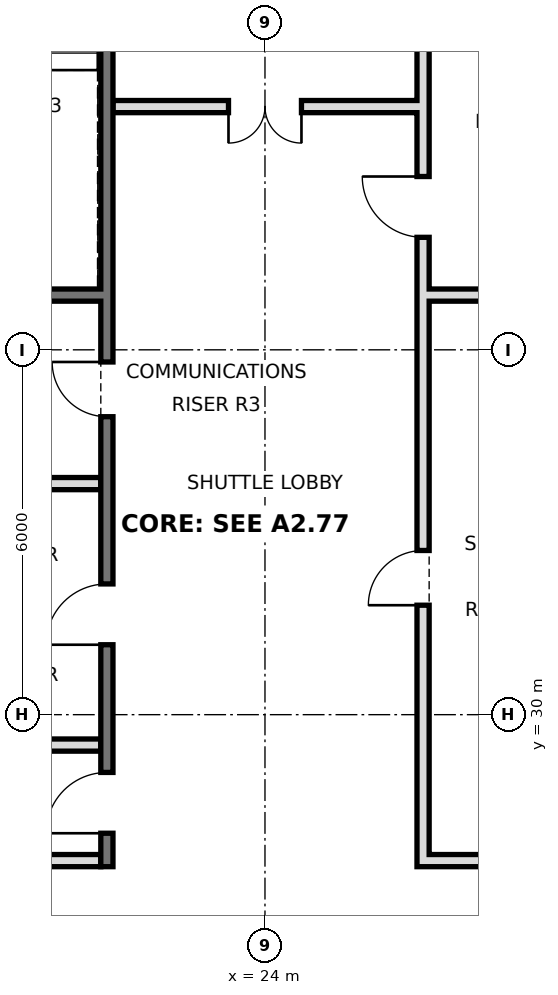
"""IFC4 building model, lengths in metres.
Left out: names, types, materials, properties, quantities, classifications, styles, units other than length and angle.
Written with IfcOpenShell. Run it as: python <this file> out.ifc"""

import sys

from ifc_helpers import new_model, si_unit, direction, frame, frame_2d, origin, place, context, subcontext, project, spatial, rectangle, extrude, element, fill, save


model = new_model("IFC4")
c1 = context("Model", 3, precision=1e-05, world=origin(), true_north=direction((0.0, 1.0)))
c2 = subcontext(c1, "Body", "Model", "MODEL_VIEW")
j1 = project(units=[si_unit("LENGTHUNIT", "METRE"), si_unit("PLANEANGLEUNIT", "RADIAN")], contexts=[c1])
p1 = place(None, origin())
s1 = spatial("IfcSite", under=j1, at=p1, CompositionType="ELEMENT")
p2 = place(p1, origin())
s2 = spatial("IfcBuilding", under=s1, at=p2, CompositionType="ELEMENT")
p3 = place(p2, frame((0.0, 0.0, 308.8)))
s3 = spatial("IfcBuildingStorey", under=s2, at=p3, CompositionType="ELEMENT", Elevation=308.8)
p4 = place(p3, frame((21.4, 27.5, 0.0), z_axis=(0.0, 0.0, 1.0), x_axis=(0.0, 1.0, 0.0)))
e1 = element("IfcWall", 1, at=p4, inside=s3, PredefinedType="SOLIDWALL", context=c2, shape_type="SweptSolid", body=[
    extrude(rectangle(XDim=17.5, YDim=0.2, at=frame_2d((8.75, 0.0))), origin(), (0.0, 0.0, 1.0), 3.42),
])
p5 = place(p4, frame((0.55, 0.0, 0.0)))
e2 = element("IfcOpeningElement", 2, at=p5, cuts=e1, PredefinedType="OPENING", context=c2, shape_type="SweptSolid", body=[
    extrude(rectangle(XDim=1.0, YDim=2.1, at=frame_2d((0.5, 1.05))), frame((0.0, 0.11, 0.0), z_axis=(0.0, -1.0, 0.0), x_axis=(1.0, 0.0, 0.0)), (0.0, 0.0, 1.0), 0.22),
])
p6 = place(p4, frame((3.65, 0.0, 0.0)))
e3 = element("IfcOpeningElement", 3, at=p6, cuts=e1, PredefinedType="OPENING", context=c2, shape_type="SweptSolid", body=[
    extrude(rectangle(XDim=1.0, YDim=2.1, at=frame_2d((0.5, 1.05))), frame((0.0, 0.11, 0.0), z_axis=(0.0, -1.0, 0.0), x_axis=(1.0, 0.0, 0.0)), (0.0, 0.0, 1.0), 0.22),
])
p7 = place(p4, frame((16.2, 0.0, 0.0)))
e4 = element("IfcOpeningElement", 4, at=p7, cuts=e1, PredefinedType="OPENING", context=c2, shape_type="SweptSolid", body=[
    extrude(rectangle(XDim=1.0, YDim=2.1, at=frame_2d((0.5, 1.05))), frame((0.0, 0.11, 0.0), z_axis=(0.0, -1.0, 0.0), x_axis=(1.0, 0.0, 0.0)), (0.0, 0.0, 1.0), 0.22),
])
p8 = place(p4, frame((7.4, 0.0, 0.0)))
e5 = element("IfcOpeningElement", 5, at=p8, cuts=e1, PredefinedType="OPENING", context=c2, shape_type="SweptSolid", body=[
    extrude(rectangle(XDim=0.9, YDim=2.1, at=frame_2d((0.45, 1.05))), frame((0.0, 0.11, 0.0), z_axis=(0.0, -1.0, 0.0), x_axis=(1.0, 0.0, 0.0)), (0.0, 0.0, 1.0), 0.22),
])
p9 = place(p3, frame((26.6, 27.5, 0.0), z_axis=(0.0, 0.0, 1.0), x_axis=(0.0, 1.0, 0.0)))
e6 = element("IfcWall", 6, at=p9, inside=s3, PredefinedType="SOLIDWALL", context=c2, shape_type="SweptSolid", body=[
    extrude(rectangle(XDim=17.5, YDim=0.2, at=frame_2d((8.75, 0.0))), origin(), (0.0, 0.0, 1.0), 3.42),
])
p10 = place(p9, frame((4.3, 0.0, 0.0)))
e7 = element("IfcOpeningElement", 7, at=p10, cuts=e6, PredefinedType="OPENING", context=c2, shape_type="SweptSolid", body=[
    extrude(rectangle(XDim=0.9, YDim=2.1, at=frame_2d((0.45, 1.05))), frame((0.0, 0.11, 0.0), z_axis=(0.0, -1.0, 0.0), x_axis=(1.0, 0.0, 0.0)), (0.0, 0.0, 1.0), 0.22),
])
p11 = place(p9, frame((10.35, 0.0, 0.0)))
e8 = element("IfcOpeningElement", 8, at=p11, cuts=e6, PredefinedType="OPENING", context=c2, shape_type="SweptSolid", body=[
    extrude(rectangle(XDim=1.0, YDim=2.1, at=frame_2d((0.5, 1.05))), frame((0.0, 0.11, 0.0), z_axis=(0.0, -1.0, 0.0), x_axis=(1.0, 0.0, 0.0)), (0.0, 0.0, 1.0), 0.22),
])
p12 = place(p9, frame((15.475, 0.0, 0.0)))
e9 = element("IfcOpeningElement", 9, at=p12, cuts=e6, PredefinedType="OPENING", context=c2, shape_type="SweptSolid", body=[
    extrude(rectangle(XDim=1.0, YDim=2.1, at=frame_2d((0.5, 1.05))), frame((0.0, 0.11, 0.0), z_axis=(0.0, -1.0, 0.0), x_axis=(1.0, 0.0, 0.0)), (0.0, 0.0, 1.0), 0.22),
])
p13 = place(p3, frame((18.6, 27.6, 0.0), z_axis=(0.0, 0.0, 1.0), x_axis=(1.0, 0.0, 0.0)))
e10 = element("IfcWall", 10, at=p13, inside=s3, PredefinedType="PARTITIONING", context=c2, shape_type="SweptSolid", body=[
    extrude(rectangle(XDim=2.7, YDim=0.2, at=frame_2d((1.35, 0.0))), origin(), (0.0, 0.0, 1.0), 3.42),
])
p14 = place(p3, frame((26.7, 27.6, 0.0), z_axis=(0.0, 0.0, 1.0), x_axis=(1.0, 0.0, 0.0)))
e11 = element("IfcWall", 11, at=p14, inside=s3, PredefinedType="SOLIDWALL", context=c2, shape_type="SweptSolid", body=[
    extrude(rectangle(XDim=2.7, YDim=0.2, at=frame_2d((1.35, 0.0))), origin(), (0.0, 0.0, 1.0), 3.42),
])
p15 = place(p3, frame((18.6, 29.5, 0.0), z_axis=(0.0, 0.0, 1.0), x_axis=(1.0, 0.0, 0.0)))
e12 = element("IfcWall", 12, at=p15, inside=s3, PredefinedType="PARTITIONING", context=c2, shape_type="SweptSolid", body=[
    extrude(rectangle(XDim=2.7, YDim=0.2, at=frame_2d((1.35, 0.0))), origin(), (0.0, 0.0, 1.0), 3.42),
])
for number, where, z_axis, x_axis in (
    (13, (18.6, 33.8, 0.0), (0.0, 0.0, 1.0), (1.0, 0.0, 0.0)),
    (14, (18.6, 36.9, 0.0), (0.0, 0.0, 1.0), (1.0, 0.0, 0.0)),
    (15, (26.7, 36.9, 0.0), (0.0, 0.0, 1.0), (1.0, 0.0, 0.0)),
):
    element("IfcWall", number, at=place(p3, frame(where, z_axis=z_axis, x_axis=x_axis)), inside=s3, PredefinedType="SOLIDWALL", context=c2, shape_type="SweptSolid", body=[
        extrude(rectangle(XDim=2.7, YDim=0.2, at=frame_2d((1.35, 0.0))), origin(), (0.0, 0.0, 1.0), 3.42),
    ])
p16 = place(p3, frame((21.5, 40.0, 0.0), z_axis=(0.0, 0.0, 1.0), x_axis=(1.0, 0.0, 0.0)))
e16 = element("IfcWall", 16, at=p16, inside=s3, PredefinedType="PARTITIONING", context=c2, shape_type="SweptSolid", body=[
    extrude(rectangle(XDim=5.0, YDim=0.2, at=frame_2d((2.5, 0.0))), origin(), (0.0, 0.0, 1.0), 3.42),
])
p17 = place(p16, frame((1.9, 0.0, 0.0)))
e17 = element("IfcOpeningElement", 17, at=p17, cuts=e16, PredefinedType="OPENING", context=c2, shape_type="SweptSolid", body=[
    extrude(rectangle(XDim=1.2, YDim=2.1, at=frame_2d((0.6, 1.05))), frame((0.0, 0.11, 0.0), z_axis=(0.0, -1.0, 0.0), x_axis=(1.0, 0.0, 0.0)), (0.0, 0.0, 1.0), 0.22),
])
p18 = place(p17, frame((1.2, 0.0, 0.0), z_axis=(0.0, 0.0, 1.0), x_axis=(-1.0, 0.0, 0.0)))
e18 = element("IfcDoor", 18, at=p18, inside=s3, OperationType="DOUBLE_DOOR_SINGLE_SWING", PredefinedType="DOOR", context=c2, shape_type="SweptSolid", body=[
    extrude(rectangle(XDim=1.2, YDim=2.1, at=frame_2d((0.6, 1.05))), frame((0.0, 0.025, 0.0), z_axis=(0.0, -1.0, 0.0), x_axis=(1.0, 0.0, 0.0)), (0.0, 0.0, 1.0), 0.05),
])
fill(e17, e18)
p19 = place(p5, origin())
e19 = element("IfcDoor", 19, at=p19, inside=s3, OperationType="SINGLE_SWING_LEFT", PredefinedType="DOOR", context=c2, shape_type="SweptSolid", body=[
    extrude(rectangle(XDim=1.0, YDim=2.1, at=frame_2d((0.5, 1.05))), frame((0.0, 0.025, 0.0), z_axis=(0.0, -1.0, 0.0), x_axis=(1.0, 0.0, 0.0)), (0.0, 0.0, 1.0), 0.05),
])
fill(e2, e19)
p20 = place(p6, origin())
e20 = element("IfcDoor", 20, at=p20, inside=s3, OperationType="SINGLE_SWING_LEFT", PredefinedType="DOOR", context=c2, shape_type="SweptSolid", body=[
    extrude(rectangle(XDim=1.0, YDim=2.1, at=frame_2d((0.5, 1.05))), frame((0.0, 0.025, 0.0), z_axis=(0.0, -1.0, 0.0), x_axis=(1.0, 0.0, 0.0)), (0.0, 0.0, 1.0), 0.05),
])
fill(e3, e20)
p21 = place(p8, frame((0.9, 0.0, 0.0), z_axis=(0.0, 0.0, 1.0), x_axis=(-1.0, 0.0, 0.0)))
e21 = element("IfcDoor", 21, at=p21, inside=s3, OperationType="SINGLE_SWING_LEFT", PredefinedType="DOOR", context=c2, shape_type="SweptSolid", body=[
    extrude(rectangle(XDim=0.9, YDim=2.1, at=frame_2d((0.45, 1.05))), frame((0.0, 0.025, 0.0), z_axis=(0.0, -1.0, 0.0), x_axis=(1.0, 0.0, 0.0)), (0.0, 0.0, 1.0), 0.05),
])
fill(e5, e21)
p22 = place(p10, origin())
e22 = element("IfcDoor", 22, at=p22, inside=s3, OperationType="SINGLE_SWING_LEFT", PredefinedType="DOOR", context=c2, shape_type="SweptSolid", body=[
    extrude(rectangle(XDim=0.9, YDim=2.1, at=frame_2d((0.45, 1.05))), frame((0.0, 0.025, 0.0), z_axis=(0.0, -1.0, 0.0), x_axis=(1.0, 0.0, 0.0)), (0.0, 0.0, 1.0), 0.05),
])
fill(e7, e22)
p23 = place(p11, frame((1.0, 0.0, 0.0), z_axis=(0.0, 0.0, 1.0), x_axis=(-1.0, 0.0, 0.0)))
e23 = element("IfcDoor", 23, at=p23, inside=s3, OperationType="SINGLE_SWING_LEFT", PredefinedType="DOOR", context=c2, shape_type="SweptSolid", body=[
    extrude(rectangle(XDim=1.0, YDim=2.1, at=frame_2d((0.5, 1.05))), frame((0.0, 0.025, 0.0), z_axis=(0.0, -1.0, 0.0), x_axis=(1.0, 0.0, 0.0)), (0.0, 0.0, 1.0), 0.05),
])
fill(e8, e23)
save(model, sys.argv[1])
